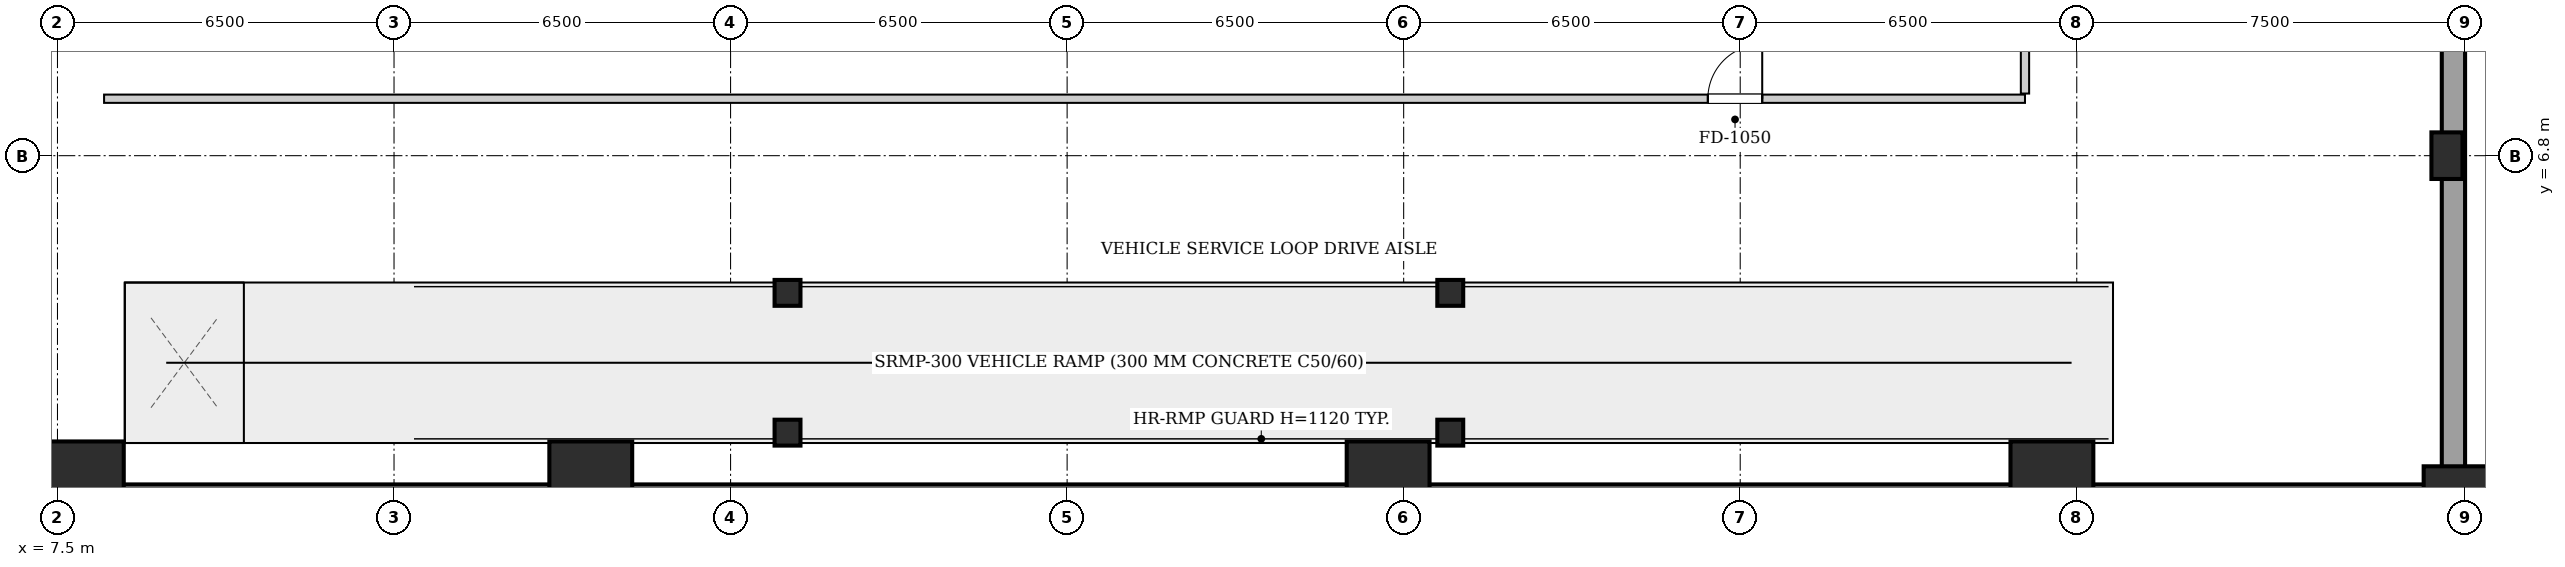
"""IFC4 building model, lengths in metres.
Left out: names, types, materials, properties, quantities, classifications, styles, units other than length and angle.
Written with IfcOpenShell. Run it as: python <this file> out.ifc"""

import sys

from ifc_helpers import new_model, si_unit, direction, frame, frame_2d, origin, origin_2d, place, context, subcontext, project, spatial, rectangle, extrude, element, fill, save


model = new_model("IFC4")
c1 = context("Model", 3, precision=1e-05, world=origin(), true_north=direction((0.0, 1.0)))
c2 = subcontext(c1, "Body", "Model", "MODEL_VIEW")
j1 = project(units=[si_unit("LENGTHUNIT", "METRE"), si_unit("PLANEANGLEUNIT", "RADIAN")], contexts=[c1])
p1 = place(None, origin())
s1 = spatial("IfcSite", under=j1, at=p1, CompositionType="ELEMENT")
p2 = place(p1, origin())
s2 = spatial("IfcBuilding", under=s1, at=p2, CompositionType="ELEMENT")
p3 = place(p2, frame((0.0, 0.0, -4.8)))
s3 = spatial("IfcBuildingStorey", under=s2, at=p3, CompositionType="ELEMENT", Elevation=-4.8)
for number, where, z_axis, x_axis in (
    (1, (21.6, 1.45, 0.0), (0.0, 0.0, 1.0), (1.0, 0.0, 0.0)),
    (2, (21.6, 4.15, 0.0), (0.0, 0.0, 1.0), (1.0, 0.0, 0.0)),
):
    element("IfcColumn", number, at=place(p3, frame(where, z_axis=z_axis, x_axis=x_axis)), inside=s3, PredefinedType="COLUMN", context=c2, shape_type="SweptSolid", body=[
        extrude(rectangle(XDim=0.5, YDim=0.5, at=origin_2d()), origin(), (0.0, 0.0, 1.0), 1.3),
    ])
for number, where, z_axis, x_axis in (
    (3, (34.4, 1.45, 0.0), (0.0, 0.0, 1.0), (1.0, 0.0, 0.0)),
    (4, (34.4, 4.15, 0.0), (0.0, 0.0, 1.0), (1.0, 0.0, 0.0)),
):
    element("IfcColumn", number, at=place(p3, frame(where, z_axis=z_axis, x_axis=x_axis)), inside=s3, PredefinedType="COLUMN", context=c2, shape_type="SweptSolid", body=[
        extrude(rectangle(XDim=0.5, YDim=0.5, at=origin_2d()), origin(), (0.0, 0.0, 1.0), 2.9),
    ])
for number, where, z_axis, x_axis in (
    (5, (54.0, 0.0, 0.0), (0.0, 0.0, 1.0), (1.0, 0.0, 0.0)),
    (6, (7.98, 0.48, 0.0), (0.0, 0.0, 1.0), (1.0, 0.0, 0.0)),
    (7, (46.02, 0.48, 0.0), (0.0, 0.0, 1.0), (1.0, 0.0, 0.0)),
    (8, (17.8, 0.48, 0.0), (0.0, 0.0, 1.0), (1.0, 0.0, 0.0)),
    (9, (33.2, 0.48, 0.0), (0.0, 0.0, 1.0), (1.0, 0.0, 0.0)),
):
    element("IfcColumn", number, at=place(p3, frame(where, z_axis=z_axis, x_axis=x_axis)), inside=s3, PredefinedType="COLUMN", context=c2, shape_type="SweptSolid", body=[
        extrude(rectangle(XDim=1.6, YDim=1.6, at=origin_2d()), origin(), (0.0, 0.0, 1.0), 4.8),
    ])
p4 = place(p3, frame((53.65, 6.8, 0.0), z_axis=(0.0, 0.0, 1.0), x_axis=(1.0, 0.0, 0.0)))
e10 = element("IfcColumn", 10, at=p4, inside=s3, PredefinedType="PILASTER", context=c2, shape_type="SweptSolid", body=[
    extrude(rectangle(XDim=0.6, YDim=0.9, at=origin_2d()), origin(), (0.0, 0.0, 1.0), 4.8),
])
p5 = place(p3, frame((53.775, 47.6, 0.0), z_axis=(0.0, 0.0, 1.0), x_axis=(0.0, -1.0, 0.0)))
e11 = element("IfcWall", 11, at=p5, inside=s3, PredefinedType="USERDEFINED", context=c2, shape_type="SweptSolid", body=[
    extrude(rectangle(XDim=47.6, YDim=0.45, at=frame_2d((23.8, 0.0))), origin(), (0.0, 0.0, 1.0), 4.48),
])
p6 = place(p3, frame((53.55, 0.225, 0.0), z_axis=(0.0, 0.0, 1.0), x_axis=(-1.0, 0.0, 0.0)))
e12 = element("IfcWall", 12, at=p6, inside=s3, PredefinedType="USERDEFINED", context=c2, shape_type="SweptSolid", body=[
    extrude(rectangle(XDim=53.1, YDim=0.45, at=frame_2d((26.55, 0.0))), origin(), (0.0, 0.0, 1.0), 4.48),
])
p7 = place(p3, frame((8.4, 7.9, 0.0), z_axis=(0.0, 0.0, 1.0), x_axis=(1.0, 0.0, 0.0)))
e13 = element("IfcWall", 13, at=p7, inside=s3, PredefinedType="PARTITIONING", context=c2, shape_type="SweptSolid", body=[
    extrude(rectangle(XDim=37.1, YDim=0.16, at=frame_2d((18.55, 0.0))), origin(), (0.0, 0.0, 1.0), 4.48),
])
p8 = place(p7, frame((30.975, 0.0, 0.0)))
e14 = element("IfcOpeningElement", 14, at=p8, cuts=e13, PredefinedType="OPENING", context=c2, shape_type="SweptSolid", body=[
    extrude(rectangle(XDim=1.05, YDim=2.05, at=frame_2d((0.525, 1.025))), frame((0.0, 0.09, 0.0), z_axis=(0.0, -1.0, 0.0), x_axis=(1.0, 0.0, 0.0)), (0.0, 0.0, 1.0), 0.18),
])
p9 = place(p3, frame((45.5, 8.0, 0.0), z_axis=(0.0, 0.0, 1.0), x_axis=(0.0, 1.0, 0.0)))
e15 = element("IfcWall", 15, at=p9, inside=s3, PredefinedType="PARTITIONING", context=c2, shape_type="SweptSolid", body=[
    extrude(rectangle(XDim=20.95, YDim=0.16, at=frame_2d((10.475, 0.0))), origin(), (0.0, 0.0, 1.0), 4.48),
])
p10 = place(p8, origin())
e16 = element("IfcDoor", 16, at=p10, inside=s3, OperationType="SINGLE_SWING_RIGHT", PredefinedType="DOOR", context=c2, shape_type="SweptSolid", body=[
    extrude(rectangle(XDim=1.05, YDim=2.05, at=frame_2d((0.525, 1.025))), frame((0.0, 0.025, 0.0), z_axis=(0.0, -1.0, 0.0), x_axis=(1.0, 0.0, 0.0)), (0.0, 0.0, 1.0), 0.05),
])
fill(e14, e16)
save(model, sys.argv[1])
